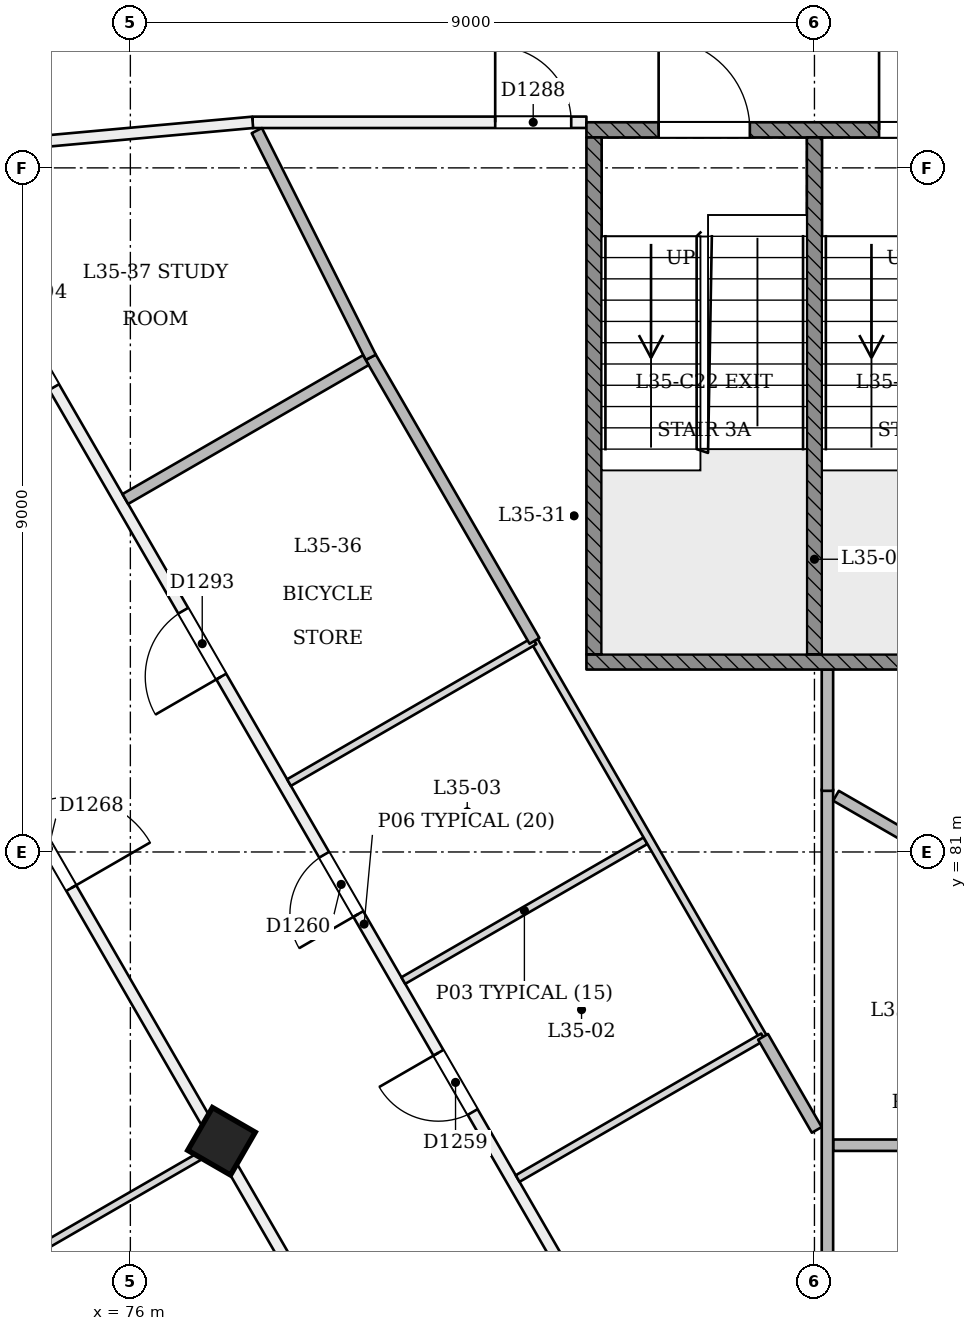
"""IFC4 building model, lengths in metres.
Left out: names, types, materials, properties, quantities, classifications, styles, units other than length and angle.
Written with IfcOpenShell. Run it as: python <this file> out.ifc"""

import sys

from ifc_helpers import new_model, si_unit, direction, frame, frame_2d, origin, origin_2d, place, context, subcontext, project, spatial, rectangle, extrude, element, fill, save


model = new_model("IFC4")
c1 = context("Model", 3, precision=1e-05, world=origin(), true_north=direction((0.0, 1.0)))
c2 = subcontext(c1, "Body", "Model", "MODEL_VIEW")
j1 = project(units=[si_unit("LENGTHUNIT", "METRE"), si_unit("PLANEANGLEUNIT", "RADIAN")], contexts=[c1])
p1 = place(None, origin())
s1 = spatial("IfcSite", under=j1, at=p1, CompositionType="ELEMENT")
p2 = place(p1, origin())
s2 = spatial("IfcBuilding", under=s1, at=p2, CompositionType="ELEMENT")
p3 = place(p2, frame((0.0, 0.0, 138.6)))
s3 = spatial("IfcBuildingStorey", under=s2, at=p3, CompositionType="ELEMENT", Elevation=138.6)
p4 = place(p3, frame((77.172, 77.147, -0.02), z_axis=(0.022222852987, 0.038483477124, 0.999012095419), x_axis=(-0.865640905988, -0.499184032545, 0.038485367762)))
e1 = element("IfcColumn", 1, at=p4, inside=s3, PredefinedType="COLUMN", context=c2, shape_type="SweptSolid", body=[
    extrude(rectangle(XDim=0.65, YDim=0.65, at=origin_2d()), origin(), (0.0, 0.0, 1.0), 3.604),
])
p5 = place(p3, frame((84.935, 69.902, 0.0), z_axis=(0.0, 0.0, 1.0), x_axis=(-0.499997468525, 0.866026865327, 0.0)))
e2 = element("IfcWall", 2, at=p5, inside=s3, PredefinedType="PARTITIONING", context=c2, shape_type="SweptSolid", body=[
    extrude(rectangle(XDim=23.438, YDim=0.15, at=frame_2d((11.719, 0.0))), origin(), (0.0, 0.0, 1.0), 3.15),
])
p6 = place(p5, frame((8.864, 0.0, 0.0)))
e3 = element("IfcOpeningElement", 3, at=p6, cuts=e2, PredefinedType="OPENING", context=c2, shape_type="SweptSolid", body=[
    extrude(rectangle(XDim=0.9, YDim=2.1, at=frame_2d((0.45, 1.05))), frame((0.0, 0.085, 0.0), z_axis=(0.0, -1.0, 0.0), x_axis=(1.0, 0.0, 0.0)), (0.0, 0.0, 1.0), 0.171),
])
p7 = place(p5, frame((11.872, 0.0, 0.0)))
e4 = element("IfcOpeningElement", 4, at=p7, cuts=e2, PredefinedType="OPENING", context=c2, shape_type="SweptSolid", body=[
    extrude(rectangle(XDim=0.9, YDim=2.1, at=frame_2d((0.45, 1.05))), frame((0.0, 0.085, 0.0), z_axis=(0.0, -1.0, 0.0), x_axis=(1.0, 0.0, 0.0)), (0.0, 0.0, 1.0), 0.171),
])
p8 = place(p5, frame((4.368, 0.0, 0.0)))
e5 = element("IfcOpeningElement", 5, at=p8, cuts=e2, PredefinedType="OPENING", context=c2, shape_type="SweptSolid", body=[
    extrude(rectangle(XDim=1.2, YDim=2.1, at=frame_2d((0.6, 1.05))), frame((0.0, 0.085, 0.0), z_axis=(0.0, -1.0, 0.0), x_axis=(1.0, 0.0, 0.0)), (0.0, 0.0, 1.0), 0.171),
])
p9 = place(p5, frame((15.479, 0.0, 0.0)))
e6 = element("IfcOpeningElement", 6, at=p9, cuts=e2, PredefinedType="OPENING", context=c2, shape_type="SweptSolid", body=[
    extrude(rectangle(XDim=1.0, YDim=2.1, at=frame_2d((0.5, 1.05))), frame((0.0, 0.085, 0.0), z_axis=(0.0, -1.0, 0.0), x_axis=(1.0, 0.0, 0.0)), (0.0, 0.0, 1.0), 0.171),
])
p10 = place(p5, frame((19.877, 0.0, 0.0)))
e7 = element("IfcOpeningElement", 7, at=p10, cuts=e2, PredefinedType="OPENING", context=c2, shape_type="SweptSolid", body=[
    extrude(rectangle(XDim=1.0, YDim=2.1, at=frame_2d((0.5, 1.05))), frame((0.0, 0.085, 0.0), z_axis=(0.0, -1.0, 0.0), x_axis=(1.0, 0.0, 0.0)), (0.0, 0.0, 1.0), 0.171),
])
p11 = place(p3, frame((96.784, 90.2, 0.0), z_axis=(0.0, 0.0, 1.0), x_axis=(-0.499996251233, -0.866027568125, 0.0)))
e8 = element("IfcWall", 8, at=p11, inside=s3, PredefinedType="PARTITIONING", context=c2, shape_type="SweptSolid", body=[
    extrude(rectangle(XDim=23.568, YDim=0.15, at=frame_2d((11.784, 0.0))), origin(), (0.0, 0.0, 1.0), 3.15),
])
p12 = place(p11, frame((17.972, 0.0, 0.0)))
e9 = element("IfcOpeningElement", 9, at=p12, cuts=e8, PredefinedType="OPENING", context=c2, shape_type="SweptSolid", body=[
    extrude(rectangle(XDim=1.0, YDim=2.1, at=frame_2d((0.5, 1.05))), frame((0.0, 0.085, 0.0), z_axis=(0.0, -1.0, 0.0), x_axis=(1.0, 0.0, 0.0)), (0.0, 0.0, 1.0), 0.171),
])
p13 = place(p11, frame((13.976, 0.0, 0.0)))
e10 = element("IfcOpeningElement", 10, at=p13, cuts=e8, PredefinedType="OPENING", context=c2, shape_type="SweptSolid", body=[
    extrude(rectangle(XDim=1.0, YDim=2.1, at=frame_2d((0.5, 1.05))), frame((0.0, 0.085, 0.0), z_axis=(0.0, -1.0, 0.0), x_axis=(1.0, 0.0, 0.0)), (0.0, 0.0, 1.0), 0.171),
])
p14 = place(p11, frame((11.077, 0.0, 0.0)))
e11 = element("IfcOpeningElement", 11, at=p14, cuts=e8, PredefinedType="OPENING", context=c2, shape_type="SweptSolid", body=[
    extrude(rectangle(XDim=1.0, YDim=2.1, at=frame_2d((0.5, 1.05))), frame((0.0, 0.085, 0.0), z_axis=(0.0, -1.0, 0.0), x_axis=(1.0, 0.0, 0.0)), (0.0, 0.0, 1.0), 0.171),
])
p15 = place(p11, frame((7.656, 0.0, 0.0)))
e12 = element("IfcOpeningElement", 12, at=p15, cuts=e8, PredefinedType="OPENING", context=c2, shape_type="SweptSolid", body=[
    extrude(rectangle(XDim=1.0, YDim=2.1, at=frame_2d((0.5, 1.05))), frame((0.0, 0.085, 0.0), z_axis=(0.0, -1.0, 0.0), x_axis=(1.0, 0.0, 0.0)), (0.0, 0.0, 1.0), 0.171),
])
p16 = place(p11, frame((2.832, 0.0, 0.0)))
e13 = element("IfcOpeningElement", 13, at=p16, cuts=e8, PredefinedType="OPENING", context=c2, shape_type="SweptSolid", body=[
    extrude(rectangle(XDim=1.0, YDim=2.1, at=frame_2d((0.5, 1.05))), frame((0.0, 0.085, 0.0), z_axis=(0.0, -1.0, 0.0), x_axis=(1.0, 0.0, 0.0)), (0.0, 0.0, 1.0), 0.171),
])
p17 = place(p3, frame((64.899, 98.406, 0.0), z_axis=(0.0, 0.0, 1.0), x_axis=(0.499995137693, -0.86602821102, 0.0)))
e14 = element("IfcWall", 14, at=p17, inside=s3, PredefinedType="PARTITIONING", context=c2, shape_type="SweptSolid", body=[
    extrude(rectangle(XDim=40.094, YDim=0.15, at=frame_2d((20.047, 0.0))), origin(), (0.0, 0.0, 1.0), 2.75),
])
p18 = place(p17, frame((0.2, 0.0, 0.0)))
e15 = element("IfcOpeningElement", 15, at=p18, cuts=e14, PredefinedType="OPENING", context=c2, shape_type="SweptSolid", body=[
    extrude(rectangle(XDim=1.2, YDim=2.1, at=frame_2d((0.6, 1.05))), frame((0.0, 0.085, 0.0), z_axis=(0.0, -1.0, 0.0), x_axis=(1.0, 0.0, 0.0)), (0.0, 0.0, 1.0), 0.171),
])
p19 = place(p17, frame((9.442, 0.0, 0.0)))
e16 = element("IfcOpeningElement", 16, at=p19, cuts=e14, PredefinedType="OPENING", context=c2, shape_type="SweptSolid", body=[
    extrude(rectangle(XDim=1.0, YDim=2.1, at=frame_2d((0.5, 1.05))), frame((0.0, 0.085, 0.0), z_axis=(0.0, -1.0, 0.0), x_axis=(1.0, 0.0, 0.0)), (0.0, 0.0, 1.0), 0.171),
])
p20 = place(p17, frame((11.652, 0.0, 0.0)))
e17 = element("IfcOpeningElement", 17, at=p20, cuts=e14, PredefinedType="OPENING", context=c2, shape_type="SweptSolid", body=[
    extrude(rectangle(XDim=1.0, YDim=2.1, at=frame_2d((0.5, 1.05))), frame((0.0, 0.085, 0.0), z_axis=(0.0, -1.0, 0.0), x_axis=(1.0, 0.0, 0.0)), (0.0, 0.0, 1.0), 0.171),
])
p21 = place(p17, frame((19.447, 0.0, 0.0)))
e18 = element("IfcOpeningElement", 18, at=p21, cuts=e14, PredefinedType="OPENING", context=c2, shape_type="SweptSolid", body=[
    extrude(rectangle(XDim=1.2, YDim=2.1, at=frame_2d((0.6, 1.05))), frame((0.0, 0.085, 0.0), z_axis=(0.0, -1.0, 0.0), x_axis=(1.0, 0.0, 0.0)), (0.0, 0.0, 1.0), 0.171),
])
p22 = place(p17, frame((27.327, 0.0, 0.0)))
e19 = element("IfcOpeningElement", 19, at=p22, cuts=e14, PredefinedType="OPENING", context=c2, shape_type="SweptSolid", body=[
    extrude(rectangle(XDim=1.0, YDim=2.1, at=frame_2d((0.5, 1.05))), frame((0.0, 0.085, 0.0), z_axis=(0.0, -1.0, 0.0), x_axis=(1.0, 0.0, 0.0)), (0.0, 0.0, 1.0), 0.171),
])
p23 = place(p17, frame((31.847, 0.0, 0.0)))
e20 = element("IfcOpeningElement", 20, at=p23, cuts=e14, PredefinedType="OPENING", context=c2, shape_type="SweptSolid", body=[
    extrude(rectangle(XDim=1.2, YDim=2.1, at=frame_2d((0.6, 1.05))), frame((0.0, 0.085, 0.0), z_axis=(0.0, -1.0, 0.0), x_axis=(1.0, 0.0, 0.0)), (0.0, 0.0, 1.0), 0.171),
])
p24 = place(p17, frame((38.558, 0.0, 0.0)))
e21 = element("IfcOpeningElement", 21, at=p24, cuts=e14, PredefinedType="OPENING", context=c2, shape_type="SweptSolid", body=[
    extrude(rectangle(XDim=1.0, YDim=2.1, at=frame_2d((0.5, 1.05))), frame((0.0, 0.085, 0.0), z_axis=(0.0, -1.0, 0.0), x_axis=(1.0, 0.0, 0.0)), (0.0, 0.0, 1.0), 0.171),
])
p25 = place(p3, frame((85.054, 63.684, 0.0), z_axis=(0.0, 0.0, 1.0), x_axis=(0.499999704591, 0.866025574339, 0.0)))
e22 = element("IfcWall", 22, at=p25, inside=s3, PredefinedType="PARTITIONING", context=c2, shape_type="SweptSolid", body=[
    extrude(rectangle(XDim=40.094, YDim=0.15, at=frame_2d((20.047, 0.0))), origin(), (0.0, 0.0, 1.0), 2.75),
])
p26 = place(p25, frame((0.506, 0.0, 0.0)))
e23 = element("IfcOpeningElement", 23, at=p26, cuts=e22, PredefinedType="OPENING", context=c2, shape_type="SweptSolid", body=[
    extrude(rectangle(XDim=1.2, YDim=2.1, at=frame_2d((0.6, 1.05))), frame((0.0, 0.085, 0.0), z_axis=(0.0, -1.0, 0.0), x_axis=(1.0, 0.0, 0.0)), (0.0, 0.0, 1.0), 0.171),
])
p27 = place(p25, frame((2.767, 0.0, 0.0)))
e24 = element("IfcOpeningElement", 24, at=p27, cuts=e22, PredefinedType="OPENING", context=c2, shape_type="SweptSolid", body=[
    extrude(rectangle(XDim=1.0, YDim=2.1, at=frame_2d((0.5, 1.05))), frame((0.0, 0.085, 0.0), z_axis=(0.0, -1.0, 0.0), x_axis=(1.0, 0.0, 0.0)), (0.0, 0.0, 1.0), 0.171),
])
p28 = place(p25, frame((8.297, 0.0, 0.0)))
e25 = element("IfcOpeningElement", 25, at=p28, cuts=e22, PredefinedType="OPENING", context=c2, shape_type="SweptSolid", body=[
    extrude(rectangle(XDim=1.0, YDim=2.1, at=frame_2d((0.5, 1.05))), frame((0.0, 0.085, 0.0), z_axis=(0.0, -1.0, 0.0), x_axis=(1.0, 0.0, 0.0)), (0.0, 0.0, 1.0), 0.171),
])
p29 = place(p25, frame((11.652, 0.0, 0.0)))
e26 = element("IfcOpeningElement", 26, at=p29, cuts=e22, PredefinedType="OPENING", context=c2, shape_type="SweptSolid", body=[
    extrude(rectangle(XDim=1.0, YDim=2.1, at=frame_2d((0.5, 1.05))), frame((0.0, 0.085, 0.0), z_axis=(0.0, -1.0, 0.0), x_axis=(1.0, 0.0, 0.0)), (0.0, 0.0, 1.0), 0.171),
])
p30 = place(p25, frame((18.327, 0.0, 0.0)))
e27 = element("IfcOpeningElement", 27, at=p30, cuts=e22, PredefinedType="OPENING", context=c2, shape_type="SweptSolid", body=[
    extrude(rectangle(XDim=1.0, YDim=2.1, at=frame_2d((0.5, 1.05))), frame((0.0, 0.085, 0.0), z_axis=(0.0, -1.0, 0.0), x_axis=(1.0, 0.0, 0.0)), (0.0, 0.0, 1.0), 0.171),
])
p31 = place(p25, frame((20.767, 0.0, 0.0)))
e28 = element("IfcOpeningElement", 28, at=p31, cuts=e22, PredefinedType="OPENING", context=c2, shape_type="SweptSolid", body=[
    extrude(rectangle(XDim=1.0, YDim=2.1, at=frame_2d((0.5, 1.05))), frame((0.0, 0.085, 0.0), z_axis=(0.0, -1.0, 0.0), x_axis=(1.0, 0.0, 0.0)), (0.0, 0.0, 1.0), 0.171),
])
p32 = place(p25, frame((26.297, 0.0, 0.0)))
e29 = element("IfcOpeningElement", 29, at=p32, cuts=e22, PredefinedType="OPENING", context=c2, shape_type="SweptSolid", body=[
    extrude(rectangle(XDim=1.0, YDim=2.1, at=frame_2d((0.5, 1.05))), frame((0.0, 0.085, 0.0), z_axis=(0.0, -1.0, 0.0), x_axis=(1.0, 0.0, 0.0)), (0.0, 0.0, 1.0), 0.171),
])
p33 = place(p25, frame((31.847, 0.0, 0.0)))
e30 = element("IfcOpeningElement", 30, at=p33, cuts=e22, PredefinedType="OPENING", context=c2, shape_type="SweptSolid", body=[
    extrude(rectangle(XDim=1.2, YDim=2.1, at=frame_2d((0.6, 1.05))), frame((0.0, 0.085, 0.0), z_axis=(0.0, -1.0, 0.0), x_axis=(1.0, 0.0, 0.0)), (0.0, 0.0, 1.0), 0.171),
])
p34 = place(p25, frame((38.694, 0.0, 0.0)))
e31 = element("IfcOpeningElement", 31, at=p34, cuts=e22, PredefinedType="OPENING", context=c2, shape_type="SweptSolid", body=[
    extrude(rectangle(XDim=1.2, YDim=2.1, at=frame_2d((0.6, 1.05))), frame((0.0, 0.085, 0.0), z_axis=(0.0, -1.0, 0.0), x_axis=(1.0, 0.0, 0.0)), (0.0, 0.0, 1.0), 0.171),
])
p35 = place(p3, frame((77.609, 90.599, 0.0), z_axis=(0.0, 0.0, 1.0), x_axis=(0.99999997527, 0.000222395191, 0.0)))
e32 = element("IfcWall", 32, at=p35, inside=s3, PredefinedType="PARTITIONING", context=c2, shape_type="SweptSolid", body=[
    extrude(rectangle(XDim=4.391, YDim=0.15, at=frame_2d((2.196, 0.0))), origin(), (0.0, 0.0, 1.0), 3.15),
])
p36 = place(p35, frame((3.191, 0.0, 0.0)))
e33 = element("IfcOpeningElement", 33, at=p36, cuts=e32, PredefinedType="OPENING", context=c2, shape_type="SweptSolid", body=[
    extrude(rectangle(XDim=1.0, YDim=2.1, at=frame_2d((0.5, 1.05))), frame((0.0, 0.085, 0.0), z_axis=(0.0, -1.0, 0.0), x_axis=(1.0, 0.0, 0.0)), (0.0, 0.0, 1.0), 0.171),
])
p37 = place(p3, frame((73.333, 90.211, 0.0), z_axis=(0.0, 0.0, 1.0), x_axis=(0.995899263414, 0.090469094901, 0.0)))
e34 = element("IfcWall", 34, at=p37, inside=s3, PredefinedType="PARTITIONING", context=c2, shape_type="SweptSolid", body=[
    extrude(rectangle(XDim=4.293, YDim=0.15, at=frame_2d((2.147, 0.0))), origin(), (0.0, 0.0, 1.0), 3.15),
])
p38 = place(p3, frame((82.777, 81.148, 0.0), z_axis=(0.0, 0.0, 1.0), x_axis=(-0.866020910976, -0.500007781692, 0.0)))
e35 = element("IfcWall", 35, at=p38, inside=s3, PredefinedType="PARTITIONING", context=c2, shape_type="SweptSolid", body=[
    extrude(rectangle(XDim=3.679, YDim=0.1, at=frame_2d((1.839, 0.0))), origin(), (0.0, 0.0, 1.0), 3.15),
])
p39 = place(p3, frame((84.334, 78.551, 0.0), z_axis=(0.0, 0.0, 1.0), x_axis=(-0.500002829465, 0.866023770186, 0.0)))
e36 = element("IfcWall", 36, at=p39, inside=s3, PredefinedType="PARTITIONING", context=c2, shape_type="SweptSolid", body=[
    extrude(rectangle(XDim=6.055, YDim=0.1, at=frame_2d((3.028, 0.0))), origin(), (0.0, 0.0, 1.0), 3.15),
])
for number, where, z_axis, x_axis in (
    (37, (81.095, 76.704, 0.0), (0.0, 0.0, 1.0), (0.866, 0.5, 0.0)),
    (38, (81.316, 83.778, 0.0), (0.0, 0.0, 1.0), (-0.866, -0.5, 0.0)),
):
    element("IfcWall", number, at=place(p3, frame(where, z_axis=z_axis, x_axis=x_axis)), inside=s3, PredefinedType="PARTITIONING", context=c2, shape_type="SweptSolid", body=[
        extrude(rectangle(XDim=3.729, YDim=0.1, at=frame_2d((1.864, 0.0))), origin(), (0.0, 0.0, 1.0), 3.15),
    ])
p40 = place(p3, frame((89.115, 77.142, 0.0), z_axis=(0.0, 0.0, 1.0), x_axis=(-1.0, 0.0, 0.0)))
e39 = element("IfcWall", 39, at=p40, inside=s3, PredefinedType="PARTITIONING", context=c2, shape_type="SweptSolid", body=[
    extrude(rectangle(XDim=3.869, YDim=0.15, at=frame_2d((1.935, 0.0))), origin(), (0.0, 0.0, 1.0), 3.15),
])
p41 = place(p3, frame((85.171, 81.824, 0.0), z_axis=(0.0, 0.0, 1.0), x_axis=(0.0, -1.0, 0.0)))
e40 = element("IfcWall", 40, at=p41, inside=s3, PredefinedType="PARTITIONING", context=c2, shape_type="SweptSolid", body=[
    extrude(rectangle(XDim=11.459, YDim=0.15, at=frame_2d((5.729, 0.0))), origin(), (0.0, 0.0, 1.0), 3.15),
])
p42 = place(p3, frame((90.18, 78.912, 0.0), z_axis=(0.0, 0.0, 1.0), x_axis=(-0.866015900655, 0.500016459542, 0.0)))
e41 = element("IfcWall", 41, at=p42, inside=s3, PredefinedType="PARTITIONING", context=c2, shape_type="SweptSolid", body=[
    extrude(rectangle(XDim=5.655, YDim=0.15, at=frame_2d((2.827, 0.0))), origin(), (0.0, 0.0, 1.0), 3.15),
])
p43 = place(p3, frame((71.63, 73.948, 0.0), z_axis=(0.0, 0.0, 1.0), x_axis=(0.866025537322, 0.499999768706, 0.0)))
e42 = element("IfcWall", 42, at=p43, inside=s3, PredefinedType="PARTITIONING", context=c2, shape_type="SweptSolid", body=[
    extrude(rectangle(XDim=6.325, YDim=0.1, at=frame_2d((3.163, 0.0))), origin(), (0.0, 0.0, 1.0), 2.65),
])
p44 = place(p3, frame((84.324, 78.568, 0.0), z_axis=(0.0, 0.0, 1.0), x_axis=(0.499946688677, -0.866056180903, 0.0)))
e43 = element("IfcWall", 43, at=p44, inside=s3, PredefinedType="PARTITIONING", context=c2, shape_type="SweptSolid", body=[
    extrude(rectangle(XDim=1.414, YDim=0.15, at=frame_2d((0.707, 0.0))), origin(), (0.0, 0.0, 1.0), 3.15),
])
p45 = place(p3, frame((85.171, 81.804, 0.0), z_axis=(0.0, 0.0, 1.0), x_axis=(0.0, 1.0, 0.0)))
e44 = element("IfcWall", 44, at=p45, inside=s3, PredefinedType="PARTITIONING", context=c2, shape_type="SweptSolid", body=[
    extrude(rectangle(XDim=1.595, YDim=0.15, at=frame_2d((0.798, 0.0))), origin(), (0.0, 0.0, 1.0), 3.15),
])
p46 = place(p3, frame((79.163, 87.508, 0.0), z_axis=(0.0, 0.0, 1.0), x_axis=(0.500003735859, -0.866023246874, 0.0)))
e45 = element("IfcWall", 45, at=p46, inside=s3, PredefinedType="PARTITIONING", context=c2, shape_type="SweptSolid", body=[
    extrude(rectangle(XDim=4.308, YDim=0.15, at=frame_2d((2.154, 0.0))), origin(), (0.0, 0.0, 1.0), 3.15),
])
p47 = place(p3, frame((77.664, 90.49, 0.0), z_axis=(0.0, 0.0, 1.0), x_axis=(0.449114371816, -0.893474275527, 0.0)))
e46 = element("IfcWall", 46, at=p47, inside=s3, PredefinedType="PARTITIONING", context=c2, shape_type="SweptSolid", body=[
    extrude(rectangle(XDim=3.338, YDim=0.15, at=frame_2d((1.669, 0.0))), origin(), (0.0, 0.0, 1.0), 3.15),
])
p48 = place(p3, frame((79.098, 87.47, 0.0), z_axis=(0.0, 0.0, 1.0), x_axis=(-0.866026469644, -0.499998153873, 0.0)))
e47 = element("IfcWall", 47, at=p48, inside=s3, PredefinedType="PARTITIONING", context=c2, shape_type="SweptSolid", body=[
    extrude(rectangle(XDim=3.654, YDim=0.15, at=frame_2d((1.827, 0.0))), origin(), (0.0, 0.0, 1.0), 3.15),
])
p49 = place(p3, frame((82.0, 90.5, 0.0), z_axis=(0.0, 0.0, 1.0), x_axis=(1.0, 0.0, 0.0)))
e48 = element("IfcWall", 48, at=p49, inside=s3, PredefinedType="SOLIDWALL", context=c2, shape_type="SweptSolid", body=[
    extrude(rectangle(XDim=6.0, YDim=0.2, at=frame_2d((3.0, 0.0))), origin(), (0.0, 0.0, 1.0), 3.15),
])
p50 = place(p49, frame((0.95, 0.0, 0.0)))
e49 = element("IfcOpeningElement", 49, at=p50, cuts=e48, PredefinedType="OPENING", context=c2, shape_type="SweptSolid", body=[
    extrude(rectangle(XDim=1.2, YDim=2.1, at=frame_2d((0.6, 1.05))), frame((0.0, 0.11, 0.0), z_axis=(0.0, -1.0, 0.0), x_axis=(1.0, 0.0, 0.0)), (0.0, 0.0, 1.0), 0.221),
])
p51 = place(p49, frame((3.85, 0.0, 0.0)))
e50 = element("IfcOpeningElement", 50, at=p51, cuts=e48, PredefinedType="OPENING", context=c2, shape_type="SweptSolid", body=[
    extrude(rectangle(XDim=1.2, YDim=2.1, at=frame_2d((0.6, 1.05))), frame((0.0, 0.11, 0.0), z_axis=(0.0, -1.0, 0.0), x_axis=(1.0, 0.0, 0.0)), (0.0, 0.0, 1.0), 0.221),
])
p52 = place(p3, frame((82.0, 83.5, 0.0), z_axis=(0.0, 0.0, 1.0), x_axis=(1.0, 0.0, 0.0)))
e51 = element("IfcWall", 51, at=p52, inside=s3, PredefinedType="SOLIDWALL", context=c2, shape_type="SweptSolid", body=[
    extrude(rectangle(XDim=6.0, YDim=0.2, at=frame_2d((3.0, 0.0))), origin(), (0.0, 0.0, 1.0), 3.15),
])
for number, where, z_axis, x_axis in (
    (52, (82.1, 83.6, 0.0), (0.0, 0.0, 1.0), (0.0, 1.0, 0.0)),
    (53, (85.0, 83.6, 0.0), (0.0, 0.0, 1.0), (0.0, 1.0, 0.0)),
):
    element("IfcWall", number, at=place(p3, frame(where, z_axis=z_axis, x_axis=x_axis)), inside=s3, PredefinedType="SOLIDWALL", context=c2, shape_type="SweptSolid", body=[
        extrude(rectangle(XDim=6.8, YDim=0.2, at=frame_2d((3.4, 0.0))), origin(), (0.0, 0.0, 1.0), 3.15),
    ])
p53 = place(p6, origin())
e54 = element("IfcDoor", 54, at=p53, inside=s3, OperationType="SINGLE_SWING_RIGHT", PredefinedType="NOTDEFINED", context=c2, shape_type="SweptSolid", body=[
    extrude(rectangle(XDim=0.9, YDim=2.1, at=frame_2d((0.45, 1.05))), frame((0.0, 0.025, 0.0), z_axis=(0.0, -1.0, 0.0), x_axis=(1.0, 0.0, 0.0)), (0.0, 0.0, 1.0), 0.05),
])
fill(e3, e54)
p54 = place(p7, origin())
e55 = element("IfcDoor", 55, at=p54, inside=s3, OperationType="SINGLE_SWING_LEFT", PredefinedType="NOTDEFINED", context=c2, shape_type="SweptSolid", body=[
    extrude(rectangle(XDim=0.9, YDim=2.1, at=frame_2d((0.45, 1.05))), frame((0.0, 0.025, 0.0), z_axis=(0.0, -1.0, 0.0), x_axis=(1.0, 0.0, 0.0)), (0.0, 0.0, 1.0), 0.05),
])
fill(e4, e55)
p55 = place(p21, origin())
e56 = element("IfcDoor", 56, at=p55, inside=s3, OperationType="SINGLE_SWING_RIGHT", PredefinedType="NOTDEFINED", context=c2, shape_type="SweptSolid", body=[
    extrude(rectangle(XDim=1.2, YDim=2.1, at=frame_2d((0.6, 1.05))), frame((0.0, 0.025, 0.0), z_axis=(0.0, -1.0, 0.0), x_axis=(1.0, 0.0, 0.0)), (0.0, 0.0, 1.0), 0.05),
])
fill(e18, e56)
p56 = place(p36, origin())
e57 = element("IfcDoor", 57, at=p56, inside=s3, OperationType="SINGLE_SWING_LEFT", PredefinedType="NOTDEFINED", context=c2, shape_type="SweptSolid", body=[
    extrude(rectangle(XDim=1.0, YDim=2.1, at=frame_2d((0.5, 1.05))), frame((0.0, 0.025, 0.0), z_axis=(0.0, -1.0, 0.0), x_axis=(1.0, 0.0, 0.0)), (0.0, 0.0, 1.0), 0.05),
])
fill(e33, e57)
p57 = place(p9, origin())
e58 = element("IfcDoor", 58, at=p57, inside=s3, OperationType="SINGLE_SWING_LEFT", PredefinedType="NOTDEFINED", context=c2, shape_type="SweptSolid", body=[
    extrude(rectangle(XDim=1.0, YDim=2.1, at=frame_2d((0.5, 1.05))), frame((0.0, 0.025, 0.0), z_axis=(0.0, -1.0, 0.0), x_axis=(1.0, 0.0, 0.0)), (0.0, 0.0, 1.0), 0.05),
])
fill(e6, e58)
p58 = place(p10, origin())
e59 = element("IfcDoor", 59, at=p58, inside=s3, OperationType="SINGLE_SWING_RIGHT", PredefinedType="NOTDEFINED", context=c2, shape_type="SweptSolid", body=[
    extrude(rectangle(XDim=1.0, YDim=2.1, at=frame_2d((0.5, 1.05))), frame((0.0, 0.025, 0.0), z_axis=(0.0, -1.0, 0.0), x_axis=(1.0, 0.0, 0.0)), (0.0, 0.0, 1.0), 0.05),
])
fill(e7, e59)
p59 = place(p50, origin())
e60 = element("IfcDoor", 60, at=p59, inside=s3, OperationType="SINGLE_SWING_LEFT", PredefinedType="NOTDEFINED", context=c2, shape_type="SweptSolid", body=[
    extrude(rectangle(XDim=1.2, YDim=2.1, at=frame_2d((0.6, 1.05))), frame((0.0, 0.025, 0.0), z_axis=(0.0, -1.0, 0.0), x_axis=(1.0, 0.0, 0.0)), (0.0, 0.0, 1.0), 0.05),
])
fill(e49, e60)
p60 = place(p51, origin())
e61 = element("IfcDoor", 61, at=p60, inside=s3, OperationType="SINGLE_SWING_LEFT", PredefinedType="NOTDEFINED", context=c2, shape_type="SweptSolid", body=[
    extrude(rectangle(XDim=1.2, YDim=2.1, at=frame_2d((0.6, 1.05))), frame((0.0, 0.025, 0.0), z_axis=(0.0, -1.0, 0.0), x_axis=(1.0, 0.0, 0.0)), (0.0, 0.0, 1.0), 0.05),
])
fill(e50, e61)
save(model, sys.argv[1])
